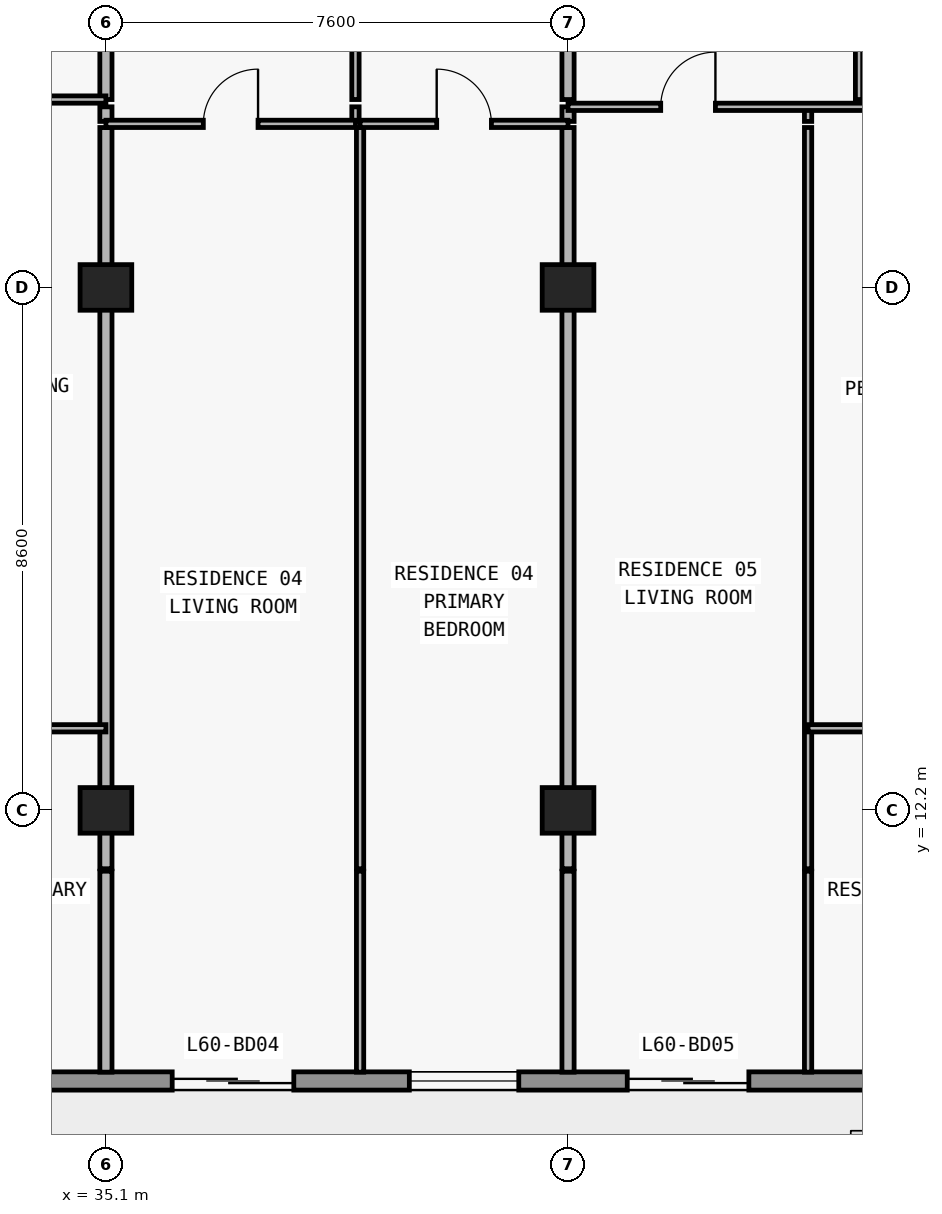
"""IFC4 building model, lengths in metres.
Left out: names, types, materials, properties, quantities, classifications, styles, units other than length and angle.
Written with IfcOpenShell. Run it as: python <this file> out.ifc"""

import sys

from ifc_helpers import new_model, si_unit, direction, frame, frame_2d, origin, origin_2d, place, context, subcontext, project, spatial, rectangle, extrude, element, fill, save


model = new_model("IFC4")
c1 = context("Model", 3, precision=1e-05, world=origin(), true_north=direction((0.0, 1.0)))
c2 = subcontext(c1, "Body", "Model", "MODEL_VIEW")
j1 = project(units=[si_unit("LENGTHUNIT", "METRE"), si_unit("PLANEANGLEUNIT", "RADIAN")], contexts=[c1])
p1 = place(None, origin())
s1 = spatial("IfcSite", under=j1, at=p1, CompositionType="ELEMENT")
p2 = place(p1, origin())
s2 = spatial("IfcBuilding", under=s1, at=p2, CompositionType="ELEMENT")
p3 = place(p2, frame((0.0, 0.0, 214.8)))
s3 = spatial("IfcBuildingStorey", under=s2, at=p3, CompositionType="ELEMENT", Elevation=214.8)
for number, where, z_axis, x_axis in (
    (1, (35.1, 12.2, 0.0), (0.0, 0.0, 1.0), (1.0, 0.0, 0.0)),
    (2, (42.7, 12.2, 0.0), (0.0, 0.0, 1.0), (1.0, 0.0, 0.0)),
    (3, (35.1, 20.8, 0.0), (0.0, 0.0, 1.0), (1.0, 0.0, 0.0)),
    (4, (42.7, 20.8, 0.0), (0.0, 0.0, 1.0), (1.0, 0.0, 0.0)),
):
    element("IfcColumn", number, at=place(p3, frame(where, z_axis=z_axis, x_axis=x_axis)), inside=s3, PredefinedType="COLUMN", context=c2, shape_type="SweptSolid", body=[
        extrude(rectangle(XDim=0.85, YDim=0.75, at=origin_2d()), origin(), (0.0, 0.0, 1.0), 3.05),
    ])
p4 = place(p3, frame((67.7, 7.75, 0.0), z_axis=(0.0, 0.0, 1.0), x_axis=(-1.0, 0.0, 0.0)))
e5 = element("IfcWall", 5, at=p4, inside=s3, PredefinedType="STANDARD", context=c2, shape_type="SweptSolid", body=[
    extrude(rectangle(XDim=57.6, YDim=0.3, at=frame_2d((28.8, 0.0))), origin(), (0.0, 0.0, 1.0), 3.05),
])
p5 = place(p4, frame((54.673, 0.0, 0.0)))
e6 = element("IfcOpeningElement", 6, at=p5, cuts=e5, PredefinedType="OPENING", context=c2, shape_type="SweptSolid", body=[
    extrude(rectangle(XDim=2.0, YDim=2.3, at=frame_2d((1.0, 1.15))), frame((0.0, 0.16, 0.0), z_axis=(0.0, -1.0, 0.0), x_axis=(1.0, 0.0, 0.0)), (0.0, 0.0, 1.0), 0.32),
])
p6 = place(p4, frame((50.473, 0.0, 0.85)))
e7 = element("IfcOpeningElement", 7, at=p6, cuts=e5, PredefinedType="OPENING", context=c2, shape_type="SweptSolid", body=[
    extrude(rectangle(XDim=2.2, YDim=1.55, at=frame_2d((1.1, 0.775))), frame((0.0, 0.16, 0.0), z_axis=(0.0, -1.0, 0.0), x_axis=(1.0, 0.0, 0.0)), (0.0, 0.0, 1.0), 0.32),
])
p7 = place(p4, frame((46.09, 0.0, 0.0)))
e8 = element("IfcOpeningElement", 8, at=p7, cuts=e5, PredefinedType="OPENING", context=c2, shape_type="SweptSolid", body=[
    extrude(rectangle(XDim=2.0, YDim=2.3, at=frame_2d((1.0, 1.15))), frame((0.0, 0.16, 0.0), z_axis=(0.0, -1.0, 0.0), x_axis=(1.0, 0.0, 0.0)), (0.0, 0.0, 1.0), 0.32),
])
p8 = place(p4, frame((41.99, 0.0, 0.85)))
e9 = element("IfcOpeningElement", 9, at=p8, cuts=e5, PredefinedType="OPENING", context=c2, shape_type="SweptSolid", body=[
    extrude(rectangle(XDim=1.8, YDim=1.55, at=frame_2d((0.9, 0.775))), frame((0.0, 0.16, 0.0), z_axis=(0.0, -1.0, 0.0), x_axis=(1.0, 0.0, 0.0)), (0.0, 0.0, 1.0), 0.32),
])
p9 = place(p4, frame((38.026, 0.0, 0.0)))
e10 = element("IfcOpeningElement", 10, at=p9, cuts=e5, PredefinedType="OPENING", context=c2, shape_type="SweptSolid", body=[
    extrude(rectangle(XDim=2.0, YDim=2.3, at=frame_2d((1.0, 1.15))), frame((0.0, 0.16, 0.0), z_axis=(0.0, -1.0, 0.0), x_axis=(1.0, 0.0, 0.0)), (0.0, 0.0, 1.0), 0.32),
])
p10 = place(p4, frame((33.726, 0.0, 0.85)))
e11 = element("IfcOpeningElement", 11, at=p10, cuts=e5, PredefinedType="OPENING", context=c2, shape_type="SweptSolid", body=[
    extrude(rectangle(XDim=2.2, YDim=1.55, at=frame_2d((1.1, 0.775))), frame((0.0, 0.16, 0.0), z_axis=(0.0, -1.0, 0.0), x_axis=(1.0, 0.0, 0.0)), (0.0, 0.0, 1.0), 0.32),
])
p11 = place(p4, frame((29.51, 0.0, 0.0)))
e12 = element("IfcOpeningElement", 12, at=p11, cuts=e5, PredefinedType="OPENING", context=c2, shape_type="SweptSolid", body=[
    extrude(rectangle(XDim=2.0, YDim=2.3, at=frame_2d((1.0, 1.15))), frame((0.0, 0.16, 0.0), z_axis=(0.0, -1.0, 0.0), x_axis=(1.0, 0.0, 0.0)), (0.0, 0.0, 1.0), 0.32),
])
p12 = place(p4, frame((25.81, 0.0, 0.85)))
e13 = element("IfcOpeningElement", 13, at=p12, cuts=e5, PredefinedType="OPENING", context=c2, shape_type="SweptSolid", body=[
    extrude(rectangle(XDim=1.8, YDim=1.55, at=frame_2d((0.9, 0.775))), frame((0.0, 0.16, 0.0), z_axis=(0.0, -1.0, 0.0), x_axis=(1.0, 0.0, 0.0)), (0.0, 0.0, 1.0), 0.32),
])
p13 = place(p4, frame((22.026, 0.0, 0.0)))
e14 = element("IfcOpeningElement", 14, at=p13, cuts=e5, PredefinedType="OPENING", context=c2, shape_type="SweptSolid", body=[
    extrude(rectangle(XDim=2.0, YDim=2.3, at=frame_2d((1.0, 1.15))), frame((0.0, 0.16, 0.0), z_axis=(0.0, -1.0, 0.0), x_axis=(1.0, 0.0, 0.0)), (0.0, 0.0, 1.0), 0.32),
])
p14 = place(p4, frame((17.726, 0.0, 0.85)))
e15 = element("IfcOpeningElement", 15, at=p14, cuts=e5, PredefinedType="OPENING", context=c2, shape_type="SweptSolid", body=[
    extrude(rectangle(XDim=2.2, YDim=1.55, at=frame_2d((1.1, 0.775))), frame((0.0, 0.16, 0.0), z_axis=(0.0, -1.0, 0.0), x_axis=(1.0, 0.0, 0.0)), (0.0, 0.0, 1.0), 0.32),
])
p15 = place(p4, frame((13.29, 0.0, 0.0)))
e16 = element("IfcOpeningElement", 16, at=p15, cuts=e5, PredefinedType="OPENING", context=c2, shape_type="SweptSolid", body=[
    extrude(rectangle(XDim=2.0, YDim=2.3, at=frame_2d((1.0, 1.15))), frame((0.0, 0.16, 0.0), z_axis=(0.0, -1.0, 0.0), x_axis=(1.0, 0.0, 0.0)), (0.0, 0.0, 1.0), 0.32),
])
p16 = place(p4, frame((9.19, 0.0, 0.85)))
e17 = element("IfcOpeningElement", 17, at=p16, cuts=e5, PredefinedType="OPENING", context=c2, shape_type="SweptSolid", body=[
    extrude(rectangle(XDim=1.8, YDim=1.55, at=frame_2d((0.9, 0.775))), frame((0.0, 0.16, 0.0), z_axis=(0.0, -1.0, 0.0), x_axis=(1.0, 0.0, 0.0)), (0.0, 0.0, 1.0), 0.32),
])
p17 = place(p4, frame((5.273, 0.0, 0.0)))
e18 = element("IfcOpeningElement", 18, at=p17, cuts=e5, PredefinedType="OPENING", context=c2, shape_type="SweptSolid", body=[
    extrude(rectangle(XDim=2.0, YDim=2.3, at=frame_2d((1.0, 1.15))), frame((0.0, 0.16, 0.0), z_axis=(0.0, -1.0, 0.0), x_axis=(1.0, 0.0, 0.0)), (0.0, 0.0, 1.0), 0.32),
])
p18 = place(p4, frame((1.073, 0.0, 0.85)))
e19 = element("IfcOpeningElement", 19, at=p18, cuts=e5, PredefinedType="OPENING", context=c2, shape_type="SweptSolid", body=[
    extrude(rectangle(XDim=2.2, YDim=1.55, at=frame_2d((1.1, 0.775))), frame((0.0, 0.16, 0.0), z_axis=(0.0, -1.0, 0.0), x_axis=(1.0, 0.0, 0.0)), (0.0, 0.0, 1.0), 0.32),
])
p19 = place(p3, frame((35.1, 7.895, 0.0), z_axis=(0.0, 0.0, 1.0), x_axis=(0.0, 1.0, 0.0)))
e20 = element("IfcWall", 20, at=p19, inside=s3, PredefinedType="PARTITIONING", context=c2, shape_type="SweptSolid", body=[
    extrude(rectangle(XDim=3.305, YDim=0.2, at=frame_2d((1.652, 0.0))), origin(), (0.0, 0.0, 1.0), 3.05),
])
p20 = place(p3, frame((35.1, 11.24, 0.0), z_axis=(0.0, 0.0, 1.0), x_axis=(0.0, 1.0, 0.0)))
e21 = element("IfcWall", 21, at=p20, inside=s3, PredefinedType="PARTITIONING", context=c2, shape_type="SweptSolid", body=[
    extrude(rectangle(XDim=12.19, YDim=0.2, at=frame_2d((6.095, 0.0))), origin(), (0.0, 0.0, 1.0), 2.263),
])
p21 = place(p3, frame((35.1, 23.53, 0.0), z_axis=(0.0, 0.0, 1.0), x_axis=(0.0, 1.0, 0.0)))
e22 = element("IfcWall", 22, at=p21, inside=s3, PredefinedType="PARTITIONING", context=c2, shape_type="SweptSolid", body=[
    extrude(rectangle(XDim=0.24, YDim=0.2, at=frame_2d((0.12, 0.0))), origin(), (0.0, 0.0, 1.0), 2.263),
])
p22 = place(p3, frame((35.1, 23.89, 0.0), z_axis=(0.0, 0.0, 1.0), x_axis=(0.0, 1.0, 0.0)))
e23 = element("IfcWall", 23, at=p22, inside=s3, PredefinedType="PARTITIONING", context=c2, shape_type="SweptSolid", body=[
    extrude(rectangle(XDim=4.69, YDim=0.2, at=frame_2d((2.345, 0.0))), origin(), (0.0, 0.0, 1.0), 2.263),
])
p23 = place(p3, frame((39.204, 23.53, 0.0), z_axis=(0.0, 0.0, 1.0), x_axis=(0.0, 1.0, 0.0)))
e24 = element("IfcWall", 24, at=p23, inside=s3, PredefinedType="PARTITIONING", context=c2, shape_type="SweptSolid", body=[
    extrude(rectangle(XDim=0.24, YDim=0.12, at=frame_2d((0.12, 0.0))), origin(), (0.0, 0.0, 1.0), 3.05),
])
p24 = place(p3, frame((39.204, 23.89, 0.0), z_axis=(0.0, 0.0, 1.0), x_axis=(0.0, 1.0, 0.0)))
e25 = element("IfcWall", 25, at=p24, inside=s3, PredefinedType="PARTITIONING", context=c2, shape_type="SweptSolid", body=[
    extrude(rectangle(XDim=4.69, YDim=0.12, at=frame_2d((2.345, 0.0))), origin(), (0.0, 0.0, 1.0), 3.05),
])
p25 = place(p24, frame((1.895, 0.0, 0.0)))
e26 = element("IfcOpeningElement", 26, at=p25, cuts=e25, PredefinedType="OPENING", context=c2, shape_type="SweptSolid", body=[
    extrude(rectangle(XDim=0.9, YDim=2.15, at=frame_2d((0.45, 1.075))), frame((0.0, 0.07, 0.0), z_axis=(0.0, -1.0, 0.0), x_axis=(1.0, 0.0, 0.0)), (0.0, 0.0, 1.0), 0.14),
])
p26 = place(p3, frame((39.28, 7.895, 0.0), z_axis=(0.0, 0.0, 1.0), x_axis=(0.0, 1.0, 0.0)))
e27 = element("IfcWall", 27, at=p26, inside=s3, PredefinedType="PARTITIONING", context=c2, shape_type="SweptSolid", body=[
    extrude(rectangle(XDim=3.305, YDim=0.12, at=frame_2d((1.652, 0.0))), origin(), (0.0, 0.0, 1.0), 3.05),
])
p27 = place(p3, frame((39.28, 11.24, 0.0), z_axis=(0.0, 0.0, 1.0), x_axis=(0.0, 1.0, 0.0)))
e28 = element("IfcWall", 28, at=p27, inside=s3, PredefinedType="PARTITIONING", context=c2, shape_type="SweptSolid", body=[
    extrude(rectangle(XDim=12.19, YDim=0.12, at=frame_2d((6.095, 0.0))), origin(), (0.0, 0.0, 1.0), 3.05),
])
p28 = place(p3, frame((42.7, 7.895, 0.0), z_axis=(0.0, 0.0, 1.0), x_axis=(0.0, 1.0, 0.0)))
e29 = element("IfcWall", 29, at=p28, inside=s3, PredefinedType="PARTITIONING", context=c2, shape_type="SweptSolid", body=[
    extrude(rectangle(XDim=3.305, YDim=0.2, at=frame_2d((1.652, 0.0))), origin(), (0.0, 0.0, 1.0), 3.05),
])
p29 = place(p3, frame((42.7, 11.24, 0.0), z_axis=(0.0, 0.0, 1.0), x_axis=(0.0, 1.0, 0.0)))
e30 = element("IfcWall", 30, at=p29, inside=s3, PredefinedType="PARTITIONING", context=c2, shape_type="SweptSolid", body=[
    extrude(rectangle(XDim=12.19, YDim=0.2, at=frame_2d((6.095, 0.0))), origin(), (0.0, 0.0, 1.0), 2.263),
])
p30 = place(p3, frame((42.7, 23.53, 0.0), z_axis=(0.0, 0.0, 1.0), x_axis=(0.0, 1.0, 0.0)))
e31 = element("IfcWall", 31, at=p30, inside=s3, PredefinedType="PARTITIONING", context=c2, shape_type="SweptSolid", body=[
    extrude(rectangle(XDim=0.24, YDim=0.2, at=frame_2d((0.12, 0.0))), origin(), (0.0, 0.0, 1.0), 2.263),
])
p31 = place(p3, frame((42.7, 23.89, 0.0), z_axis=(0.0, 0.0, 1.0), x_axis=(0.0, 1.0, 0.0)))
e32 = element("IfcWall", 32, at=p31, inside=s3, PredefinedType="PARTITIONING", context=c2, shape_type="SweptSolid", body=[
    extrude(rectangle(XDim=4.69, YDim=0.2, at=frame_2d((2.345, 0.0))), origin(), (0.0, 0.0, 1.0), 2.263),
])
p32 = place(p3, frame((46.648, 7.895, 0.0), z_axis=(0.0, 0.0, 1.0), x_axis=(0.0, 1.0, 0.0)))
e33 = element("IfcWall", 33, at=p32, inside=s3, PredefinedType="PARTITIONING", context=c2, shape_type="SweptSolid", body=[
    extrude(rectangle(XDim=3.305, YDim=0.12, at=frame_2d((1.652, 0.0))), origin(), (0.0, 0.0, 1.0), 3.05),
])
p33 = place(p3, frame((46.648, 11.24, 0.0), z_axis=(0.0, 0.0, 1.0), x_axis=(0.0, 1.0, 0.0)))
e34 = element("IfcWall", 34, at=p33, inside=s3, PredefinedType="PARTITIONING", context=c2, shape_type="SweptSolid", body=[
    extrude(rectangle(XDim=12.19, YDim=0.12, at=frame_2d((6.095, 0.0))), origin(), (0.0, 0.0, 1.0), 3.05),
])
p34 = place(p3, frame((46.648, 23.53, 0.0), z_axis=(0.0, 0.0, 1.0), x_axis=(0.0, 1.0, 0.0)))
e35 = element("IfcWall", 35, at=p34, inside=s3, PredefinedType="PARTITIONING", context=c2, shape_type="SweptSolid", body=[
    extrude(rectangle(XDim=0.24, YDim=0.12, at=frame_2d((0.12, 0.0))), origin(), (0.0, 0.0, 1.0), 3.05),
])
p35 = place(p3, frame((47.486, 23.89, 0.0), z_axis=(0.0, 0.0, 1.0), x_axis=(0.0, 1.0, 0.0)))
e36 = element("IfcWall", 36, at=p35, inside=s3, PredefinedType="PARTITIONING", context=c2, shape_type="SweptSolid", body=[
    extrude(rectangle(XDim=4.69, YDim=0.12, at=frame_2d((2.345, 0.0))), origin(), (0.0, 0.0, 1.0), 3.05),
])
p36 = place(p35, frame((1.895, 0.0, 0.0)))
e37 = element("IfcOpeningElement", 37, at=p36, cuts=e36, PredefinedType="OPENING", context=c2, shape_type="SweptSolid", body=[
    extrude(rectangle(XDim=0.9, YDim=2.15, at=frame_2d((0.45, 1.075))), frame((0.0, 0.07, 0.0), z_axis=(0.0, -1.0, 0.0), x_axis=(1.0, 0.0, 0.0)), (0.0, 0.0, 1.0), 0.14),
])
p37 = place(p3, frame((30.648, 13.55, 0.0), z_axis=(0.0, 0.0, 1.0), x_axis=(1.0, 0.0, 0.0)))
e38 = element("IfcWall", 38, at=p37, inside=s3, PredefinedType="PARTITIONING", context=c2, shape_type="SweptSolid", body=[
    extrude(rectangle(XDim=4.452, YDim=0.12, at=frame_2d((2.226, 0.0))), origin(), (0.0, 0.0, 1.0), 3.05),
])
p38 = place(p37, frame((1.776, 0.0, 0.0)))
e39 = element("IfcOpeningElement", 39, at=p38, cuts=e38, PredefinedType="OPENING", context=c2, shape_type="SweptSolid", body=[
    extrude(rectangle(XDim=0.9, YDim=2.15, at=frame_2d((0.45, 1.075))), frame((0.0, 0.07, 0.0), z_axis=(0.0, -1.0, 0.0), x_axis=(1.0, 0.0, 0.0)), (0.0, 0.0, 1.0), 0.14),
])
p39 = place(p3, frame((46.648, 13.55, 0.0), z_axis=(0.0, 0.0, 1.0), x_axis=(1.0, 0.0, 0.0)))
e40 = element("IfcWall", 40, at=p39, inside=s3, PredefinedType="PARTITIONING", context=c2, shape_type="SweptSolid", body=[
    extrude(rectangle(XDim=4.452, YDim=0.12, at=frame_2d((2.226, 0.0))), origin(), (0.0, 0.0, 1.0), 3.05),
])
p40 = place(p39, frame((1.776, 0.0, 0.0)))
e41 = element("IfcOpeningElement", 41, at=p40, cuts=e40, PredefinedType="OPENING", context=c2, shape_type="SweptSolid", body=[
    extrude(rectangle(XDim=0.9, YDim=2.15, at=frame_2d((0.45, 1.075))), frame((0.0, 0.07, 0.0), z_axis=(0.0, -1.0, 0.0), x_axis=(1.0, 0.0, 0.0)), (0.0, 0.0, 1.0), 0.14),
])
p41 = place(p3, frame((35.1, 23.49, 0.0), z_axis=(0.0, 0.0, 1.0), x_axis=(1.0, 0.0, 0.0)))
e42 = element("IfcWall", 42, at=p41, inside=s3, PredefinedType="PARTITIONING", context=c2, shape_type="SweptSolid", body=[
    extrude(rectangle(XDim=4.104, YDim=0.12, at=frame_2d((2.052, 0.0))), origin(), (0.0, 0.0, 1.0), 3.05),
])
p42 = place(p41, frame((1.602, 0.0, 0.0)))
e43 = element("IfcOpeningElement", 43, at=p42, cuts=e42, PredefinedType="OPENING", context=c2, shape_type="SweptSolid", body=[
    extrude(rectangle(XDim=0.9, YDim=2.15, at=frame_2d((0.45, 1.075))), frame((0.0, 0.07, 0.0), z_axis=(0.0, -1.0, 0.0), x_axis=(1.0, 0.0, 0.0)), (0.0, 0.0, 1.0), 0.14),
])
p43 = place(p3, frame((39.28, 23.49, 0.0), z_axis=(0.0, 0.0, 1.0), x_axis=(1.0, 0.0, 0.0)))
e44 = element("IfcWall", 44, at=p43, inside=s3, PredefinedType="PARTITIONING", context=c2, shape_type="SweptSolid", body=[
    extrude(rectangle(XDim=3.42, YDim=0.12, at=frame_2d((1.71, 0.0))), origin(), (0.0, 0.0, 1.0), 3.05),
])
p44 = place(p43, frame((1.26, 0.0, 0.0)))
e45 = element("IfcOpeningElement", 45, at=p44, cuts=e44, PredefinedType="OPENING", context=c2, shape_type="SweptSolid", body=[
    extrude(rectangle(XDim=0.9, YDim=2.15, at=frame_2d((0.45, 1.075))), frame((0.0, 0.07, 0.0), z_axis=(0.0, -1.0, 0.0), x_axis=(1.0, 0.0, 0.0)), (0.0, 0.0, 1.0), 0.14),
])
p45 = place(p3, frame((42.7, 23.77, 0.0), z_axis=(0.0, 0.0, 1.0), x_axis=(1.0, 0.0, 0.0)))
e46 = element("IfcWall", 46, at=p45, inside=s3, PredefinedType="PARTITIONING", context=c2, shape_type="SweptSolid", body=[
    extrude(rectangle(XDim=8.18, YDim=0.12, at=frame_2d((4.09, 0.0))), origin(), (0.0, 0.0, 1.0), 3.05),
])
p46 = place(p45, frame((1.524, 0.0, 0.0)))
e47 = element("IfcOpeningElement", 47, at=p46, cuts=e46, PredefinedType="OPENING", context=c2, shape_type="SweptSolid", body=[
    extrude(rectangle(XDim=0.9, YDim=2.15, at=frame_2d((0.45, 1.075))), frame((0.0, 0.07, 0.0), z_axis=(0.0, -1.0, 0.0), x_axis=(1.0, 0.0, 0.0)), (0.0, 0.0, 1.0), 0.14),
])
p47 = place(p45, frame((6.033, 0.0, 0.0)))
e48 = element("IfcOpeningElement", 48, at=p47, cuts=e46, PredefinedType="OPENING", context=c2, shape_type="SweptSolid", body=[
    extrude(rectangle(XDim=0.9, YDim=2.15, at=frame_2d((0.45, 1.075))), frame((0.0, 0.07, 0.0), z_axis=(0.0, -1.0, 0.0), x_axis=(1.0, 0.0, 0.0)), (0.0, 0.0, 1.0), 0.14),
])
p48 = place(p3, frame((26.92, 23.89, 0.0), z_axis=(0.0, 0.0, 1.0), x_axis=(1.0, 0.0, 0.0)))
e49 = element("IfcWall", 49, at=p48, inside=s3, PredefinedType="PARTITIONING", context=c2, shape_type="SweptSolid", body=[
    extrude(rectangle(XDim=8.18, YDim=0.12, at=frame_2d((4.09, 0.0))), origin(), (0.0, 0.0, 1.0), 3.05),
])
p49 = place(p48, frame((1.414, 0.0, 0.0)))
e50 = element("IfcOpeningElement", 50, at=p49, cuts=e49, PredefinedType="OPENING", context=c2, shape_type="SweptSolid", body=[
    extrude(rectangle(XDim=0.9, YDim=2.15, at=frame_2d((0.45, 1.075))), frame((0.0, 0.07, 0.0), z_axis=(0.0, -1.0, 0.0), x_axis=(1.0, 0.0, 0.0)), (0.0, 0.0, 1.0), 0.14),
])
p50 = place(p48, frame((5.673, 0.0, 0.0)))
e51 = element("IfcOpeningElement", 51, at=p50, cuts=e49, PredefinedType="OPENING", context=c2, shape_type="SweptSolid", body=[
    extrude(rectangle(XDim=0.9, YDim=2.15, at=frame_2d((0.45, 1.075))), frame((0.0, 0.07, 0.0), z_axis=(0.0, -1.0, 0.0), x_axis=(1.0, 0.0, 0.0)), (0.0, 0.0, 1.0), 0.14),
])
p51 = place(p11, origin())
e52 = element("IfcDoor", 52, at=p51, inside=s3, OperationType="DOUBLE_DOOR_SLIDING", PredefinedType="DOOR", context=c2, shape_type="SweptSolid", body=[
    extrude(rectangle(XDim=2.0, YDim=2.3, at=frame_2d((1.0, 1.15))), frame((0.0, 0.025, 0.0), z_axis=(0.0, -1.0, 0.0), x_axis=(1.0, 0.0, 0.0)), (0.0, 0.0, 1.0), 0.05),
])
fill(e12, e52)
p52 = place(p12, origin())
e53 = element("IfcWindow", 53, at=p52, inside=s3, PartitioningType="SINGLE_PANEL", PredefinedType="WINDOW", context=c2, shape_type="SweptSolid", body=[
    extrude(rectangle(XDim=1.8, YDim=1.55, at=frame_2d((0.9, 0.775))), frame((0.0, 0.03, 0.0), z_axis=(0.0, -1.0, 0.0), x_axis=(1.0, 0.0, 0.0)), (0.0, 0.0, 1.0), 0.06),
])
fill(e13, e53)
p53 = place(p13, origin())
e54 = element("IfcDoor", 54, at=p53, inside=s3, OperationType="DOUBLE_DOOR_SLIDING", PredefinedType="DOOR", context=c2, shape_type="SweptSolid", body=[
    extrude(rectangle(XDim=2.0, YDim=2.3, at=frame_2d((1.0, 1.15))), frame((0.0, 0.025, 0.0), z_axis=(0.0, -1.0, 0.0), x_axis=(1.0, 0.0, 0.0)), (0.0, 0.0, 1.0), 0.05),
])
fill(e14, e54)
p54 = place(p42, origin())
e55 = element("IfcDoor", 55, at=p54, inside=s3, OperationType="SINGLE_SWING_RIGHT", PredefinedType="DOOR", context=c2, shape_type="SweptSolid", body=[
    extrude(rectangle(XDim=0.9, YDim=2.15, at=frame_2d((0.45, 1.075))), frame((0.0, 0.025, 0.0), z_axis=(0.0, -1.0, 0.0), x_axis=(1.0, 0.0, 0.0)), (0.0, 0.0, 1.0), 0.05),
])
fill(e43, e55)
p55 = place(p44, origin())
e56 = element("IfcDoor", 56, at=p55, inside=s3, OperationType="SINGLE_SWING_LEFT", PredefinedType="DOOR", context=c2, shape_type="SweptSolid", body=[
    extrude(rectangle(XDim=0.9, YDim=2.15, at=frame_2d((0.45, 1.075))), frame((0.0, 0.025, 0.0), z_axis=(0.0, -1.0, 0.0), x_axis=(1.0, 0.0, 0.0)), (0.0, 0.0, 1.0), 0.05),
])
fill(e45, e56)
p56 = place(p46, origin())
e57 = element("IfcDoor", 57, at=p56, inside=s3, OperationType="SINGLE_SWING_RIGHT", PredefinedType="DOOR", context=c2, shape_type="SweptSolid", body=[
    extrude(rectangle(XDim=0.9, YDim=2.15, at=frame_2d((0.45, 1.075))), frame((0.0, 0.025, 0.0), z_axis=(0.0, -1.0, 0.0), x_axis=(1.0, 0.0, 0.0)), (0.0, 0.0, 1.0), 0.05),
])
fill(e47, e57)
save(model, sys.argv[1])
